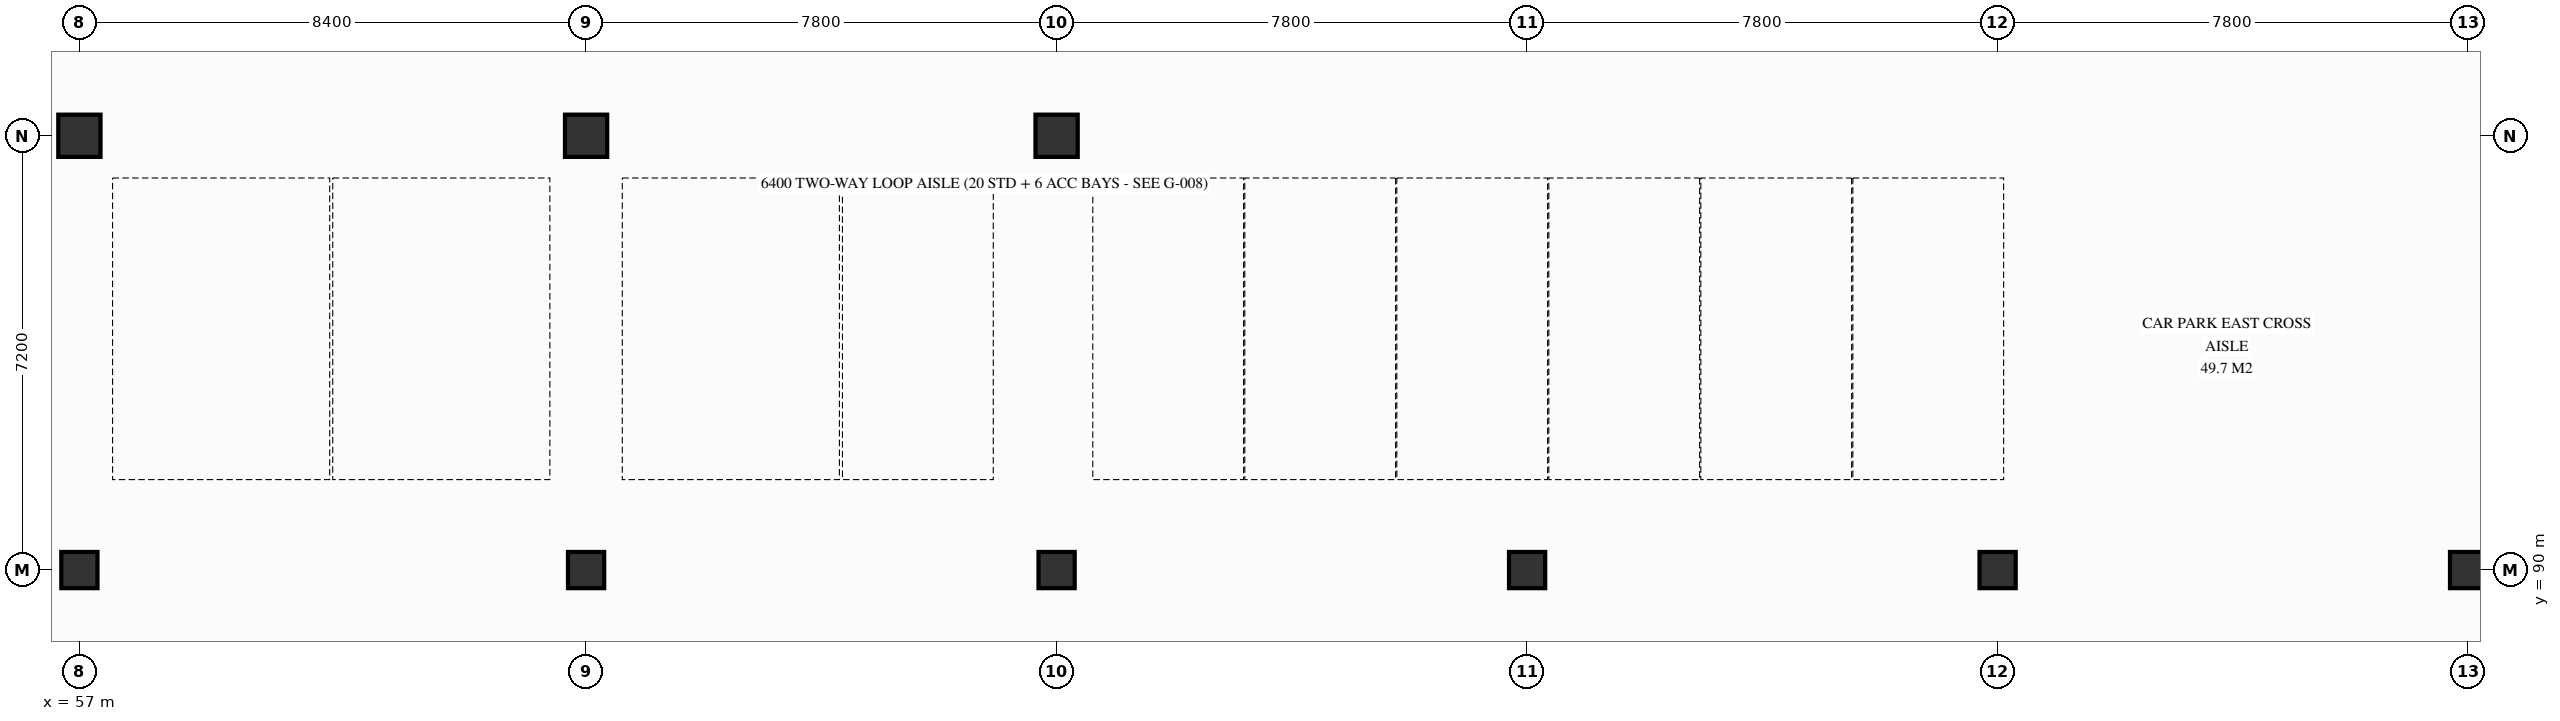
"""IFC4 building model, lengths in metres.
Left out: names, types, materials, properties, quantities, classifications, styles, units other than length and angle.
Written with IfcOpenShell. Run it as: python <this file> out.ifc"""

import sys

from ifc_helpers import new_model, si_unit, direction, frame, origin, origin_2d, place, context, subcontext, project, spatial, rectangle, extrude, element, save


model = new_model("IFC4")
c1 = context("Model", 3, precision=1e-05, world=origin(), true_north=direction((0.0, 1.0)))
c2 = subcontext(c1, "Body", "Model", "MODEL_VIEW")
j1 = project(units=[si_unit("LENGTHUNIT", "METRE"), si_unit("PLANEANGLEUNIT", "RADIAN")], contexts=[c1])
p1 = place(None, origin())
s1 = spatial("IfcSite", under=j1, at=p1, CompositionType="ELEMENT")
p2 = place(p1, origin())
s2 = spatial("IfcBuilding", under=s1, at=p2, CompositionType="ELEMENT")
p3 = place(p2, frame((0.0, 0.0, -4.5)))
s3 = spatial("IfcBuildingStorey", under=s2, at=p3, CompositionType="ELEMENT", Elevation=-4.5)
p4 = place(p3, frame((57.0, 90.0, 0.0), z_axis=(0.0, 0.0, 1.0), x_axis=(1.0, 0.0, 0.0)))
e1 = element("IfcColumn", 1, at=p4, inside=s3, PredefinedType="COLUMN", context=c2, shape_type="SweptSolid", body=[
    extrude(rectangle(XDim=0.6, YDim=0.6, at=origin_2d()), origin(), (0.0, 0.0, 1.0), 4.5),
])
p5 = place(p3, frame((57.0, 97.2, 0.0), z_axis=(0.0, 0.0, 1.0), x_axis=(1.0, 0.0, 0.0)))
e2 = element("IfcColumn", 2, at=p5, inside=s3, PredefinedType="COLUMN", context=c2, shape_type="SweptSolid", body=[
    extrude(rectangle(XDim=0.7, YDim=0.7, at=origin_2d()), origin(), (0.0, 0.0, 1.0), 4.5),
])
p6 = place(p3, frame((65.4, 90.0, 0.0), z_axis=(0.0, 0.0, 1.0), x_axis=(1.0, 0.0, 0.0)))
e3 = element("IfcColumn", 3, at=p6, inside=s3, PredefinedType="COLUMN", context=c2, shape_type="SweptSolid", body=[
    extrude(rectangle(XDim=0.6, YDim=0.6, at=origin_2d()), origin(), (0.0, 0.0, 1.0), 4.5),
])
p7 = place(p3, frame((65.4, 97.2, 0.0), z_axis=(0.0, 0.0, 1.0), x_axis=(1.0, 0.0, 0.0)))
e4 = element("IfcColumn", 4, at=p7, inside=s3, PredefinedType="COLUMN", context=c2, shape_type="SweptSolid", body=[
    extrude(rectangle(XDim=0.7, YDim=0.7, at=origin_2d()), origin(), (0.0, 0.0, 1.0), 4.5),
])
p8 = place(p3, frame((73.2, 90.0, 0.0), z_axis=(0.0, 0.0, 1.0), x_axis=(1.0, 0.0, 0.0)))
e5 = element("IfcColumn", 5, at=p8, inside=s3, PredefinedType="COLUMN", context=c2, shape_type="SweptSolid", body=[
    extrude(rectangle(XDim=0.6, YDim=0.6, at=origin_2d()), origin(), (0.0, 0.0, 1.0), 4.5),
])
p9 = place(p3, frame((73.2, 97.2, 0.0), z_axis=(0.0, 0.0, 1.0), x_axis=(1.0, 0.0, 0.0)))
e6 = element("IfcColumn", 6, at=p9, inside=s3, PredefinedType="COLUMN", context=c2, shape_type="SweptSolid", body=[
    extrude(rectangle(XDim=0.7, YDim=0.7, at=origin_2d()), origin(), (0.0, 0.0, 1.0), 4.5),
])
for number, where, z_axis, x_axis in (
    (7, (81.0, 90.0, 0.0), (0.0, 0.0, 1.0), (1.0, 0.0, 0.0)),
    (8, (88.8, 90.0, 0.0), (0.0, 0.0, 1.0), (1.0, 0.0, 0.0)),
    (9, (96.6, 90.0, 0.0), (0.0, 0.0, 1.0), (1.0, 0.0, 0.0)),
):
    element("IfcColumn", number, at=place(p3, frame(where, z_axis=z_axis, x_axis=x_axis)), inside=s3, PredefinedType="COLUMN", context=c2, shape_type="SweptSolid", body=[
        extrude(rectangle(XDim=0.6, YDim=0.6, at=origin_2d()), origin(), (0.0, 0.0, 1.0), 4.5),
    ])
save(model, sys.argv[1])
